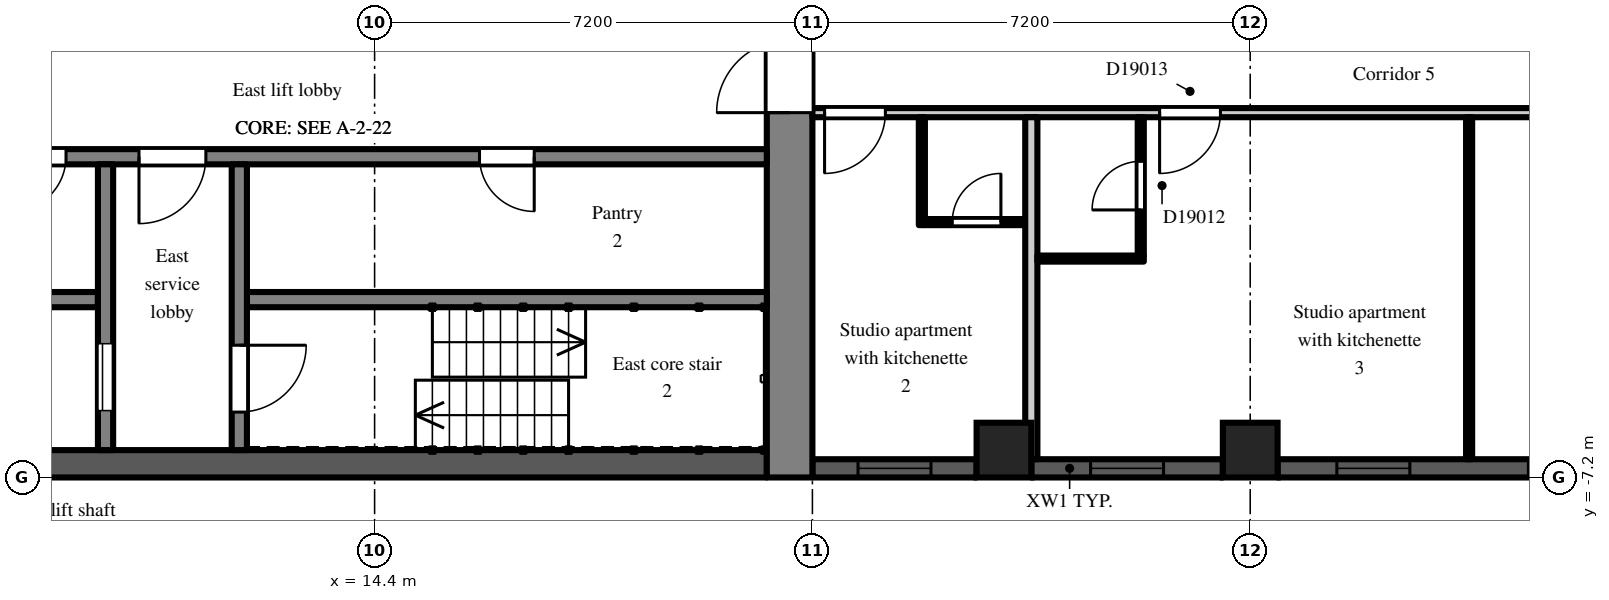
"""IFC4 building model, lengths in metres.
Left out: names, types, materials, properties, quantities, classifications, styles, units other than length and angle.
Written with IfcOpenShell. Run it as: python <this file> out.ifc"""

import sys

from ifc_helpers import new_model, si_unit, direction, frame, frame_2d, origin, origin_2d, place, context, subcontext, project, spatial, rectangle, extrude, element, fill, save


model = new_model("IFC4")
c1 = context("Model", 3, precision=1e-05, world=origin(), true_north=direction((0.0, 1.0)))
c2 = subcontext(c1, "Body", "Model", "MODEL_VIEW")
j1 = project(units=[si_unit("LENGTHUNIT", "METRE"), si_unit("PLANEANGLEUNIT", "RADIAN")], contexts=[c1])
p1 = place(None, origin())
s1 = spatial("IfcSite", under=j1, at=p1, CompositionType="ELEMENT")
p2 = place(p1, origin())
s2 = spatial("IfcBuilding", under=s1, at=p2, CompositionType="ELEMENT")
p3 = place(p2, frame((0.0, 0.0, 129.3)))
s3 = spatial("IfcBuildingStorey", under=s2, at=p3, CompositionType="ELEMENT", Elevation=129.3)
for number, where, z_axis, x_axis in (
    (1, (24.75, -6.75, 0.0), (0.0, 0.0, 1.0), (1.0, 0.0, 0.0)),
    (2, (28.8, -6.75, 0.0), (0.0, 0.0, 1.0), (1.0, 0.0, 0.0)),
):
    element("IfcColumn", number, at=place(p3, frame(where, z_axis=z_axis, x_axis=x_axis)), inside=s3, PredefinedType="COLUMN", context=c2, shape_type="SweptSolid", body=[
        extrude(rectangle(XDim=0.9, YDim=0.9, at=origin_2d()), origin(), (0.0, 0.0, 1.0), 3.0),
    ])
p4 = place(p3, frame((21.6, -7.05, 0.0), z_axis=(0.0, 0.0, 1.0), x_axis=(1.0, 0.0, 0.0)))
e3 = element("IfcWall", 3, at=p4, inside=s3, PredefinedType="SOLIDWALL", context=c2, shape_type="SweptSolid", body=[
    extrude(rectangle(XDim=2.7, YDim=0.3, at=frame_2d((1.35, 0.0))), origin(), (0.0, 0.0, 1.0), 2.2),
])
p5 = place(p4, frame((0.75, 0.0, 0.2)))
e4 = element("IfcOpeningElement", 4, at=p5, cuts=e3, PredefinedType="OPENING", context=c2, shape_type="SweptSolid", body=[
    extrude(rectangle(XDim=1.2, YDim=1.85, at=frame_2d((0.6, 0.925))), frame((0.0, 0.16, 0.0), z_axis=(0.0, -1.0, 0.0), x_axis=(1.0, 0.0, 0.0)), (0.0, 0.0, 1.0), 0.32),
])
p6 = place(p3, frame((25.2, -7.05, 0.0), z_axis=(0.0, 0.0, 1.0), x_axis=(1.0, 0.0, 0.0)))
e5 = element("IfcWall", 5, at=p6, inside=s3, PredefinedType="SOLIDWALL", context=c2, shape_type="SweptSolid", body=[
    extrude(rectangle(XDim=3.15, YDim=0.3, at=frame_2d((1.575, 0.0))), origin(), (0.0, 0.0, 1.0), 2.2),
])
p7 = place(p6, frame((0.975, 0.0, 0.2)))
e6 = element("IfcOpeningElement", 6, at=p7, cuts=e5, PredefinedType="OPENING", context=c2, shape_type="SweptSolid", body=[
    extrude(rectangle(XDim=1.2, YDim=1.85, at=frame_2d((0.6, 0.925))), frame((0.0, 0.16, 0.0), z_axis=(0.0, -1.0, 0.0), x_axis=(1.0, 0.0, 0.0)), (0.0, 0.0, 1.0), 0.32),
])
p8 = place(p3, frame((29.25, -7.05, 0.0), z_axis=(0.0, 0.0, 1.0), x_axis=(1.0, 0.0, 0.0)))
e7 = element("IfcWall", 7, at=p8, inside=s3, PredefinedType="SOLIDWALL", context=c2, shape_type="SweptSolid", body=[
    extrude(rectangle(XDim=6.3, YDim=0.3, at=frame_2d((3.15, 0.0))), origin(), (0.0, 0.0, 1.0), 2.2),
])
p9 = place(p8, frame((0.975, 0.0, 0.2)))
e8 = element("IfcOpeningElement", 8, at=p9, cuts=e7, PredefinedType="OPENING", context=c2, shape_type="SweptSolid", body=[
    extrude(rectangle(XDim=1.2, YDim=1.85, at=frame_2d((0.6, 0.925))), frame((0.0, 0.16, 0.0), z_axis=(0.0, -1.0, 0.0), x_axis=(1.0, 0.0, 0.0)), (0.0, 0.0, 1.0), 0.32),
])
p10 = place(p8, frame((4.125, 0.0, 0.2)))
e9 = element("IfcOpeningElement", 9, at=p10, cuts=e7, PredefinedType="OPENING", context=c2, shape_type="SweptSolid", body=[
    extrude(rectangle(XDim=1.2, YDim=1.85, at=frame_2d((0.6, 0.925))), frame((0.0, 0.16, 0.0), z_axis=(0.0, -1.0, 0.0), x_axis=(1.0, 0.0, 0.0)), (0.0, 0.0, 1.0), 0.32),
])
p11 = place(p3, frame((21.225, -7.2, 0.0), z_axis=(0.0, 0.0, 1.0), x_axis=(0.0, 1.0, 0.0)))
e10 = element("IfcWall", 10, at=p11, inside=s3, PredefinedType="SHEAR", context=c2, shape_type="SweptSolid", body=[
    extrude(rectangle(XDim=14.4, YDim=0.75, at=frame_2d((7.2, 0.0))), origin(), (0.0, 0.0, 1.0), 2.6),
])
p12 = place(p11, frame((6.0, 0.0, 0.0)))
e11 = element("IfcOpeningElement", 11, at=p12, cuts=e10, PredefinedType="OPENING", context=c2, shape_type="SweptSolid", body=[
    extrude(rectangle(XDim=2.4, YDim=2.2, at=frame_2d((1.2, 1.1))), frame((0.0, 0.385, 0.0), z_axis=(0.0, -1.0, 0.0), x_axis=(1.0, 0.0, 0.0)), (0.0, 0.0, 1.0), 0.77),
])
p13 = place(p3, frame((7.9, -6.975, 0.0), z_axis=(0.0, 0.0, 1.0), x_axis=(1.0, 0.0, 0.0)))
e12 = element("IfcWall", 12, at=p13, inside=s3, PredefinedType="SHEAR", context=c2, shape_type="SweptSolid", body=[
    extrude(rectangle(XDim=12.95, YDim=0.45, at=frame_2d((6.475, 0.0))), origin(), (0.0, 0.0, 1.0), 2.6),
])
p14 = place(p3, frame((7.9, -1.925, 0.0), z_axis=(0.0, 0.0, 1.0), x_axis=(1.0, 0.0, 0.0)))
e13 = element("IfcWall", 13, at=p14, inside=s3, PredefinedType="SHEAR", context=c2, shape_type="SweptSolid", body=[
    extrude(rectangle(XDim=12.95, YDim=0.25, at=frame_2d((6.475, 0.0))), origin(), (0.0, 0.0, 1.0), 2.6),
])
p15 = place(p14, frame((0.525, 0.0, 0.0)))
e14 = element("IfcOpeningElement", 14, at=p15, cuts=e13, PredefinedType="OPENING", context=c2, shape_type="SweptSolid", body=[
    extrude(rectangle(XDim=0.9, YDim=2.1, at=frame_2d((0.45, 1.05))), frame((0.0, 0.135, 0.0), z_axis=(0.0, -1.0, 0.0), x_axis=(1.0, 0.0, 0.0)), (0.0, 0.0, 1.0), 0.27),
])
p16 = place(p14, frame((2.625, 0.0, 0.0)))
e15 = element("IfcOpeningElement", 15, at=p16, cuts=e13, PredefinedType="OPENING", context=c2, shape_type="SweptSolid", body=[
    extrude(rectangle(XDim=1.1, YDim=2.1, at=frame_2d((0.55, 1.05))), frame((0.0, 0.135, 0.0), z_axis=(0.0, -1.0, 0.0), x_axis=(1.0, 0.0, 0.0)), (0.0, 0.0, 1.0), 0.27),
])
p17 = place(p14, frame((8.225, 0.0, 0.0)))
e16 = element("IfcOpeningElement", 16, at=p17, cuts=e13, PredefinedType="OPENING", context=c2, shape_type="SweptSolid", body=[
    extrude(rectangle(XDim=0.9, YDim=2.1, at=frame_2d((0.45, 1.05))), frame((0.0, 0.135, 0.0), z_axis=(0.0, -1.0, 0.0), x_axis=(1.0, 0.0, 0.0)), (0.0, 0.0, 1.0), 0.27),
])
p18 = place(p3, frame((7.9, -4.275, 0.0), z_axis=(0.0, 0.0, 1.0), x_axis=(1.0, 0.0, 0.0)))
e17 = element("IfcWall", 17, at=p18, inside=s3, PredefinedType="SHEAR", context=c2, shape_type="SweptSolid", body=[
    extrude(rectangle(XDim=1.95, YDim=0.25, at=frame_2d((0.975, 0.0))), origin(), (0.0, 0.0, 1.0), 2.6),
])
p19 = place(p3, frame((12.3, -4.275, 0.0), z_axis=(0.0, 0.0, 1.0), x_axis=(1.0, 0.0, 0.0)))
e18 = element("IfcWall", 18, at=p19, inside=s3, PredefinedType="SHEAR", context=c2, shape_type="SweptSolid", body=[
    extrude(rectangle(XDim=8.55, YDim=0.25, at=frame_2d((4.275, 0.0))), origin(), (0.0, 0.0, 1.0), 2.6),
])
p20 = place(p3, frame((9.975, -2.05, 0.0), z_axis=(0.0, 0.0, 1.0), x_axis=(0.0, -1.0, 0.0)))
e19 = element("IfcWall", 19, at=p20, inside=s3, PredefinedType="SHEAR", context=c2, shape_type="SweptSolid", body=[
    extrude(rectangle(XDim=4.7, YDim=0.25, at=frame_2d((2.35, 0.0))), origin(), (0.0, 0.0, 1.0), 2.6),
])
p21 = place(p20, frame((2.95, 0.0, 0.0)))
e20 = element("IfcOpeningElement", 20, at=p21, cuts=e19, PredefinedType="OPENING", context=c2, shape_type="SweptSolid", body=[
    extrude(rectangle(XDim=1.1, YDim=2.1, at=frame_2d((0.55, 1.05))), frame((0.0, 0.135, 0.0), z_axis=(0.0, -1.0, 0.0), x_axis=(1.0, 0.0, 0.0)), (0.0, 0.0, 1.0), 0.27),
])
p22 = place(p3, frame((12.175, -2.05, 0.0), z_axis=(0.0, 0.0, 1.0), x_axis=(0.0, -1.0, 0.0)))
e21 = element("IfcWall", 21, at=p22, inside=s3, PredefinedType="SHEAR", context=c2, shape_type="SweptSolid", body=[
    extrude(rectangle(XDim=4.7, YDim=0.25, at=frame_2d((2.35, 0.0))), origin(), (0.0, 0.0, 1.0), 2.6),
])
p23 = place(p22, frame((2.975, 0.0, 0.0)))
e22 = element("IfcOpeningElement", 22, at=p23, cuts=e21, PredefinedType="OPENING", context=c2, shape_type="SweptSolid", body=[
    extrude(rectangle(XDim=1.1, YDim=2.1, at=frame_2d((0.55, 1.05))), frame((0.0, 0.135, 0.0), z_axis=(0.0, -1.0, 0.0), x_axis=(1.0, 0.0, 0.0)), (0.0, 0.0, 1.0), 0.27),
])
p24 = place(p3, frame((21.6, -1.2, 0.0), z_axis=(0.0, 0.0, 1.0), x_axis=(1.0, 0.0, 0.0)))
e23 = element("IfcWall", 23, at=p24, inside=s3, PredefinedType="PARTITIONING", context=c2, shape_type="SweptSolid", body=[
    extrude(rectangle(XDim=14.9, YDim=0.15, at=frame_2d((7.45, 0.0))), origin(), (0.0, 0.0, 1.0), 2.6),
])
p25 = place(p24, frame((0.2, 0.0, 0.0)))
e24 = element("IfcOpeningElement", 24, at=p25, cuts=e23, PredefinedType="OPENING", context=c2, shape_type="SweptSolid", body=[
    extrude(rectangle(XDim=1.0, YDim=2.1, at=frame_2d((0.5, 1.05))), frame((0.0, 0.085, 0.0), z_axis=(0.0, -1.0, 0.0), x_axis=(1.0, 0.0, 0.0)), (0.0, 0.0, 1.0), 0.17),
])
p26 = place(p24, frame((5.71, 0.0, 0.0)))
e25 = element("IfcOpeningElement", 25, at=p26, cuts=e23, PredefinedType="OPENING", context=c2, shape_type="SweptSolid", body=[
    extrude(rectangle(XDim=1.0, YDim=2.1, at=frame_2d((0.5, 1.05))), frame((0.0, 0.085, 0.0), z_axis=(0.0, -1.0, 0.0), x_axis=(1.0, 0.0, 0.0)), (0.0, 0.0, 1.0), 0.17),
])
p27 = place(p24, frame((11.95, 0.0, 0.0)))
e26 = element("IfcOpeningElement", 26, at=p27, cuts=e23, PredefinedType="OPENING", context=c2, shape_type="SweptSolid", body=[
    extrude(rectangle(XDim=1.8, YDim=2.1, at=frame_2d((0.9, 1.05))), frame((0.0, 0.085, 0.0), z_axis=(0.0, -1.0, 0.0), x_axis=(1.0, 0.0, 0.0)), (0.0, 0.0, 1.0), 0.17),
])
p28 = place(p3, frame((23.4, -3.05, 0.0), z_axis=(0.0, 0.0, 1.0), x_axis=(0.0, 1.0, 0.0)))
e27 = element("IfcWall", 27, at=p28, inside=s3, PredefinedType="PARTITIONING", context=c2, shape_type="SweptSolid", body=[
    extrude(rectangle(XDim=1.775, YDim=0.1, at=frame_2d((0.888, 0.0))), origin(), (0.0, 0.0, 1.0), 2.6),
])
p29 = place(p3, frame((23.45, -3.0, 0.0), z_axis=(0.0, 0.0, 1.0), x_axis=(1.0, 0.0, 0.0)))
e28 = element("IfcWall", 28, at=p29, inside=s3, PredefinedType="PARTITIONING", context=c2, shape_type="SweptSolid", body=[
    extrude(rectangle(XDim=1.65, YDim=0.1, at=frame_2d((0.825, 0.0))), origin(), (0.0, 0.0, 1.0), 2.6),
])
p30 = place(p29, frame((0.45, 0.0, 0.0)))
e29 = element("IfcOpeningElement", 29, at=p30, cuts=e28, PredefinedType="OPENING", context=c2, shape_type="SweptSolid", body=[
    extrude(rectangle(XDim=0.8, YDim=2.1, at=frame_2d((0.4, 1.05))), frame((0.0, 0.06, 0.0), z_axis=(0.0, -1.0, 0.0), x_axis=(1.0, 0.0, 0.0)), (0.0, 0.0, 1.0), 0.12),
])
p31 = place(p3, frame((25.2, -6.9, 0.0), z_axis=(0.0, 0.0, 1.0), x_axis=(0.0, 1.0, 0.0)))
e30 = element("IfcWall", 30, at=p31, inside=s3, PredefinedType="PARTITIONING", context=c2, shape_type="SweptSolid", body=[
    extrude(rectangle(XDim=5.625, YDim=0.2, at=frame_2d((2.812, 0.0))), origin(), (0.0, 0.0, 1.0), 2.6),
])
p32 = place(p3, frame((25.3, -3.6, 0.0), z_axis=(0.0, 0.0, 1.0), x_axis=(1.0, 0.0, 0.0)))
e31 = element("IfcWall", 31, at=p32, inside=s3, PredefinedType="PARTITIONING", context=c2, shape_type="SweptSolid", body=[
    extrude(rectangle(XDim=1.75, YDim=0.1, at=frame_2d((0.875, 0.0))), origin(), (0.0, 0.0, 1.0), 2.6),
])
p33 = place(p3, frame((27.0, -3.55, 0.0), z_axis=(0.0, 0.0, 1.0), x_axis=(0.0, 1.0, 0.0)))
e32 = element("IfcWall", 32, at=p33, inside=s3, PredefinedType="PARTITIONING", context=c2, shape_type="SweptSolid", body=[
    extrude(rectangle(XDim=2.275, YDim=0.1, at=frame_2d((1.138, 0.0))), origin(), (0.0, 0.0, 1.0), 2.6),
])
p34 = place(p33, frame((0.75, 0.0, 0.0)))
e33 = element("IfcOpeningElement", 33, at=p34, cuts=e32, PredefinedType="OPENING", context=c2, shape_type="SweptSolid", body=[
    extrude(rectangle(XDim=0.8, YDim=2.1, at=frame_2d((0.4, 1.05))), frame((0.0, 0.06, 0.0), z_axis=(0.0, -1.0, 0.0), x_axis=(1.0, 0.0, 0.0)), (0.0, 0.0, 1.0), 0.12),
])
p35 = place(p3, frame((32.4, -6.9, 0.0), z_axis=(0.0, 0.0, 1.0), x_axis=(0.0, 1.0, 0.0)))
e34 = element("IfcWall", 34, at=p35, inside=s3, PredefinedType="PARTITIONING", context=c2, shape_type="SweptSolid", body=[
    extrude(rectangle(XDim=5.625, YDim=0.1, at=frame_2d((2.812, 0.0))), origin(), (0.0, 0.0, 1.0), 2.6),
])
p36 = place(p5, origin())
e35 = element("IfcWindow", 35, at=p36, inside=s3, PartitioningType="SINGLE_PANEL", PredefinedType="WINDOW", context=c2, shape_type="SweptSolid", body=[
    extrude(rectangle(XDim=1.2, YDim=1.85, at=frame_2d((0.6, 0.925))), frame((0.0, 0.03, 0.0), z_axis=(0.0, -1.0, 0.0), x_axis=(1.0, 0.0, 0.0)), (0.0, 0.0, 1.0), 0.06),
])
fill(e4, e35)
p37 = place(p7, origin())
e36 = element("IfcWindow", 36, at=p37, inside=s3, PartitioningType="SINGLE_PANEL", PredefinedType="WINDOW", context=c2, shape_type="SweptSolid", body=[
    extrude(rectangle(XDim=1.2, YDim=1.85, at=frame_2d((0.6, 0.925))), frame((0.0, 0.03, 0.0), z_axis=(0.0, -1.0, 0.0), x_axis=(1.0, 0.0, 0.0)), (0.0, 0.0, 1.0), 0.06),
])
fill(e6, e36)
p38 = place(p9, origin())
e37 = element("IfcWindow", 37, at=p38, inside=s3, PartitioningType="SINGLE_PANEL", PredefinedType="WINDOW", context=c2, shape_type="SweptSolid", body=[
    extrude(rectangle(XDim=1.2, YDim=1.85, at=frame_2d((0.6, 0.925))), frame((0.0, 0.03, 0.0), z_axis=(0.0, -1.0, 0.0), x_axis=(1.0, 0.0, 0.0)), (0.0, 0.0, 1.0), 0.06),
])
fill(e8, e37)
p39 = place(p10, origin())
e38 = element("IfcWindow", 38, at=p39, inside=s3, PartitioningType="SINGLE_PANEL", PredefinedType="WINDOW", context=c2, shape_type="SweptSolid", body=[
    extrude(rectangle(XDim=1.2, YDim=1.85, at=frame_2d((0.6, 0.925))), frame((0.0, 0.03, 0.0), z_axis=(0.0, -1.0, 0.0), x_axis=(1.0, 0.0, 0.0)), (0.0, 0.0, 1.0), 0.06),
])
fill(e9, e38)
p40 = place(p21, origin())
e39 = element("IfcDoor", 39, at=p40, inside=s3, OperationType="SLIDING_TO_LEFT", PredefinedType="DOOR", context=c2, shape_type="SweptSolid", body=[
    extrude(rectangle(XDim=1.1, YDim=2.1, at=frame_2d((0.55, 1.05))), frame((0.0, 0.025, 0.0), z_axis=(0.0, -1.0, 0.0), x_axis=(1.0, 0.0, 0.0)), (0.0, 0.0, 1.0), 0.05),
])
fill(e20, e39)
p41 = place(p23, origin())
e40 = element("IfcDoor", 40, at=p41, inside=s3, OperationType="SINGLE_SWING_LEFT", PredefinedType="DOOR", context=c2, shape_type="SweptSolid", body=[
    extrude(rectangle(XDim=1.1, YDim=2.1, at=frame_2d((0.55, 1.05))), frame((0.0, 0.025, 0.0), z_axis=(0.0, -1.0, 0.0), x_axis=(1.0, 0.0, 0.0)), (0.0, 0.0, 1.0), 0.05),
])
fill(e22, e40)
p42 = place(p15, frame((0.9, 0.0, 0.0), z_axis=(0.0, 0.0, 1.0), x_axis=(-1.0, 0.0, 0.0)))
e41 = element("IfcDoor", 41, at=p42, inside=s3, OperationType="SINGLE_SWING_RIGHT", PredefinedType="DOOR", context=c2, shape_type="SweptSolid", body=[
    extrude(rectangle(XDim=0.9, YDim=2.1, at=frame_2d((0.45, 1.05))), frame((0.0, 0.025, 0.0), z_axis=(0.0, -1.0, 0.0), x_axis=(1.0, 0.0, 0.0)), (0.0, 0.0, 1.0), 0.05),
])
fill(e14, e41)
p43 = place(p16, frame((1.1, 0.0, 0.0), z_axis=(0.0, 0.0, 1.0), x_axis=(-1.0, 0.0, 0.0)))
e42 = element("IfcDoor", 42, at=p43, inside=s3, OperationType="SINGLE_SWING_RIGHT", PredefinedType="DOOR", context=c2, shape_type="SweptSolid", body=[
    extrude(rectangle(XDim=1.1, YDim=2.1, at=frame_2d((0.55, 1.05))), frame((0.0, 0.025, 0.0), z_axis=(0.0, -1.0, 0.0), x_axis=(1.0, 0.0, 0.0)), (0.0, 0.0, 1.0), 0.05),
])
fill(e15, e42)
p44 = place(p12, origin())
e43 = element("IfcDoor", 43, at=p44, inside=s3, OperationType="DOUBLE_DOOR_DOUBLE_SWING", PredefinedType="DOOR", context=c2, shape_type="SweptSolid", body=[
    extrude(rectangle(XDim=2.4, YDim=2.2, at=frame_2d((1.2, 1.1))), frame((0.0, 0.025, 0.0), z_axis=(0.0, -1.0, 0.0), x_axis=(1.0, 0.0, 0.0)), (0.0, 0.0, 1.0), 0.05),
])
fill(e11, e43)
p45 = place(p17, frame((0.9, 0.0, 0.0), z_axis=(0.0, 0.0, 1.0), x_axis=(-1.0, 0.0, 0.0)))
e44 = element("IfcDoor", 44, at=p45, inside=s3, OperationType="SINGLE_SWING_LEFT", PredefinedType="DOOR", context=c2, shape_type="SweptSolid", body=[
    extrude(rectangle(XDim=0.9, YDim=2.1, at=frame_2d((0.45, 1.05))), frame((0.0, 0.025, 0.0), z_axis=(0.0, -1.0, 0.0), x_axis=(1.0, 0.0, 0.0)), (0.0, 0.0, 1.0), 0.05),
])
fill(e16, e44)
p46 = place(p30, origin())
e45 = element("IfcDoor", 45, at=p46, inside=s3, OperationType="SINGLE_SWING_RIGHT", PredefinedType="DOOR", context=c2, shape_type="SweptSolid", body=[
    extrude(rectangle(XDim=0.8, YDim=2.1, at=frame_2d((0.4, 1.05))), frame((0.0, 0.025, 0.0), z_axis=(0.0, -1.0, 0.0), x_axis=(1.0, 0.0, 0.0)), (0.0, 0.0, 1.0), 0.05),
])
fill(e29, e45)
p47 = place(p25, frame((1.0, 0.0, 0.0), z_axis=(0.0, 0.0, 1.0), x_axis=(-1.0, 0.0, 0.0)))
e46 = element("IfcDoor", 46, at=p47, inside=s3, OperationType="SINGLE_SWING_RIGHT", PredefinedType="DOOR", context=c2, shape_type="SweptSolid", body=[
    extrude(rectangle(XDim=1.0, YDim=2.1, at=frame_2d((0.5, 1.05))), frame((0.0, 0.025, 0.0), z_axis=(0.0, -1.0, 0.0), x_axis=(1.0, 0.0, 0.0)), (0.0, 0.0, 1.0), 0.05),
])
fill(e24, e46)
p48 = place(p34, origin())
e47 = element("IfcDoor", 47, at=p48, inside=s3, OperationType="SINGLE_SWING_LEFT", PredefinedType="DOOR", context=c2, shape_type="SweptSolid", body=[
    extrude(rectangle(XDim=0.8, YDim=2.1, at=frame_2d((0.4, 1.05))), frame((0.0, 0.025, 0.0), z_axis=(0.0, -1.0, 0.0), x_axis=(1.0, 0.0, 0.0)), (0.0, 0.0, 1.0), 0.05),
])
fill(e33, e47)
p49 = place(p26, frame((1.0, 0.0, 0.0), z_axis=(0.0, 0.0, 1.0), x_axis=(-1.0, 0.0, 0.0)))
e48 = element("IfcDoor", 48, at=p49, inside=s3, OperationType="SINGLE_SWING_RIGHT", PredefinedType="DOOR", context=c2, shape_type="SweptSolid", body=[
    extrude(rectangle(XDim=1.0, YDim=2.1, at=frame_2d((0.5, 1.05))), frame((0.0, 0.025, 0.0), z_axis=(0.0, -1.0, 0.0), x_axis=(1.0, 0.0, 0.0)), (0.0, 0.0, 1.0), 0.05),
])
fill(e25, e48)
save(model, sys.argv[1])
